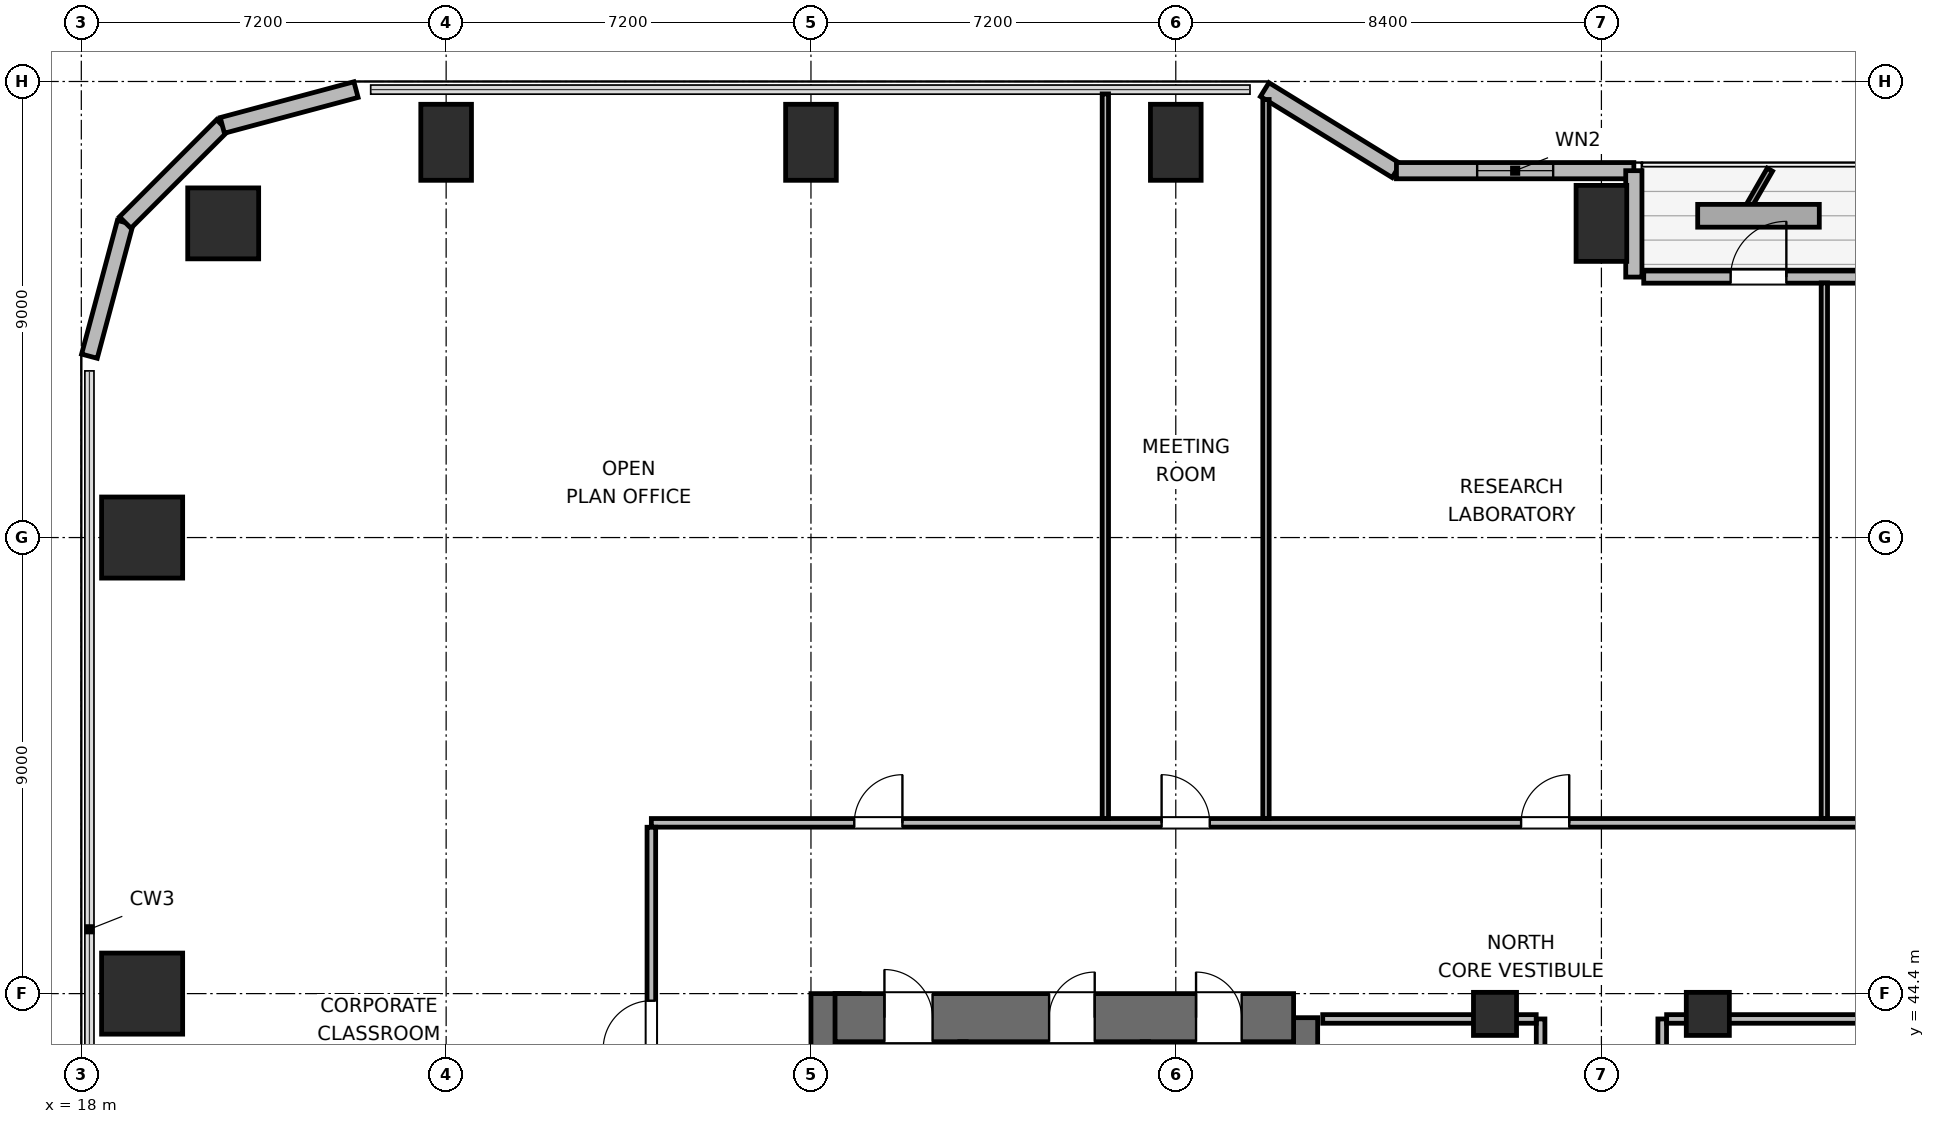
"""IFC4 building model, lengths in metres.
Left out: names, types, materials, properties, quantities, classifications, styles, units other than length and angle.
Written with IfcOpenShell. Run it as: python <this file> out.ifc"""

import sys

from ifc_helpers import new_model, si_unit, direction, frame, frame_2d, origin, origin_2d, place, context, subcontext, project, spatial, rectangle, circle, extrude, element, fill, save


model = new_model("IFC4")
c1 = context("Model", 3, precision=1e-05, world=origin(), true_north=direction((0.0, 1.0)))
c2 = subcontext(c1, "Body", "Model", "MODEL_VIEW")
j1 = project(units=[si_unit("LENGTHUNIT", "METRE"), si_unit("PLANEANGLEUNIT", "RADIAN")], contexts=[c1])
p1 = place(None, origin())
s1 = spatial("IfcSite", under=j1, at=p1, CompositionType="ELEMENT")
p2 = place(p1, origin())
s2 = spatial("IfcBuilding", under=s1, at=p2, CompositionType="ELEMENT")
p3 = place(p2, frame((0.0, 0.0, 89.7)))
s3 = spatial("IfcBuildingStorey", under=s2, at=p3, CompositionType="ELEMENT", Elevation=89.7)
p4 = place(p3, frame((32.875, 27.6, 0.0), z_axis=(0.0, 0.0, 1.0), x_axis=(0.0, 1.0, 0.0)))
e1 = element("IfcWall", 1, at=p4, inside=s3, PredefinedType="SHEAR", context=c2, shape_type="SweptSolid", body=[
    extrude(rectangle(XDim=16.8, YDim=0.95, at=frame_2d((8.4, 0.0))), origin(), (0.0, 0.0, 1.0), 3.9),
])
p5 = place(p3, frame((41.925, 37.8, 0.0), z_axis=(0.0, 0.0, 1.0), x_axis=(0.0, 1.0, 0.0)))
e2 = element("IfcWall", 2, at=p5, inside=s3, PredefinedType="SHEAR", context=c2, shape_type="SweptSolid", body=[
    extrude(rectangle(XDim=6.125, YDim=0.95, at=frame_2d((3.062, 0.0))), origin(), (0.0, 0.0, 1.0), 3.9),
])
p6 = place(p3, frame((32.875, 43.925, 0.0), z_axis=(0.0, 0.0, 1.0), x_axis=(1.0, 0.0, 0.0)))
e3 = element("IfcWall", 3, at=p6, inside=s3, PredefinedType="SHEAR", context=c2, shape_type="SweptSolid", body=[
    extrude(rectangle(XDim=9.05, YDim=0.95, at=frame_2d((4.525, 0.0))), origin(), (0.0, 0.0, 1.0), 3.9),
])
p7 = place(p6, frame((0.975, 0.0, 0.0)))
e4 = element("IfcOpeningElement", 4, at=p7, cuts=e3, PredefinedType="OPENING", context=c2, shape_type="SweptSolid", body=[
    extrude(rectangle(XDim=0.95, YDim=2.04, at=frame_2d((0.475, 1.02))), frame((0.0, 0.485, 0.0), z_axis=(0.0, -1.0, 0.0), x_axis=(1.0, 0.0, 0.0)), (0.0, 0.0, 1.0), 0.97),
])
p8 = place(p6, frame((4.225, 0.0, 0.0)))
e5 = element("IfcOpeningElement", 5, at=p8, cuts=e3, PredefinedType="OPENING", context=c2, shape_type="SweptSolid", body=[
    extrude(rectangle(XDim=0.9, YDim=2.02, at=frame_2d((0.45, 1.01))), frame((0.0, 0.485, 0.0), z_axis=(0.0, -1.0, 0.0), x_axis=(1.0, 0.0, 0.0)), (0.0, 0.0, 1.0), 0.97),
])
p9 = place(p6, frame((7.125, 0.0, 0.0)))
e6 = element("IfcOpeningElement", 6, at=p9, cuts=e3, PredefinedType="OPENING", context=c2, shape_type="SweptSolid", body=[
    extrude(rectangle(XDim=0.9, YDim=2.02, at=frame_2d((0.45, 1.01))), frame((0.0, 0.485, 0.0), z_axis=(0.0, -1.0, 0.0), x_axis=(1.0, 0.0, 0.0)), (0.0, 0.0, 1.0), 0.97),
])
p10 = place(p3, frame((20.8, 59.6, 0.0), z_axis=(0.0, 0.0, 1.0), x_axis=(1.0, 0.0, 0.0)))
e7 = element("IfcColumn", 7, at=p10, inside=s3, PredefinedType="COLUMN", context=c2, shape_type="SweptSolid", body=[
    extrude(circle(Radius=0.7, at=origin_2d()), origin(), (0.0, 0.0, 1.0), 3.9),
])
for number, where, z_axis, x_axis in (
    (8, (25.2, 61.2, 0.0), (0.0, 0.0, 1.0), (1.0, 0.0, 0.0)),
    (9, (32.4, 61.2, 0.0), (0.0, 0.0, 1.0), (1.0, 0.0, 0.0)),
    (10, (39.6, 61.2, 0.0), (0.0, 0.0, 1.0), (1.0, 0.0, 0.0)),
    (11, (48.0, 59.6, 0.0), (0.0, 0.0, 1.0), (1.0, 0.0, 0.0)),
):
    element("IfcColumn", number, at=place(p3, frame(where, z_axis=z_axis, x_axis=x_axis)), inside=s3, PredefinedType="COLUMN", context=c2, shape_type="SweptSolid", body=[
        extrude(rectangle(XDim=1.0, YDim=1.5, at=origin_2d()), origin(), (0.0, 0.0, 1.0), 3.9),
    ])
for number, where, z_axis, x_axis in (
    (12, (19.2, 44.4, 0.0), (0.0, 0.0, 1.0), (1.0, 0.0, 0.0)),
    (13, (19.2, 53.4, 0.0), (0.0, 0.0, 1.0), (1.0, 0.0, 0.0)),
):
    element("IfcColumn", number, at=place(p3, frame(where, z_axis=z_axis, x_axis=x_axis)), inside=s3, PredefinedType="COLUMN", context=c2, shape_type="SweptSolid", body=[
        extrude(rectangle(XDim=1.6, YDim=1.6, at=origin_2d()), origin(), (0.0, 0.0, 1.0), 3.9),
    ])
for number, where, z_axis, x_axis in (
    (14, (45.9, 44.0, 0.0), (0.0, 0.0, 1.0), (1.0, 0.0, 0.0)),
    (15, (50.1, 44.0, 0.0), (0.0, 0.0, 1.0), (1.0, 0.0, 0.0)),
):
    element("IfcColumn", number, at=place(p3, frame(where, z_axis=z_axis, x_axis=x_axis)), inside=s3, PredefinedType="COLUMN", context=c2, shape_type="SweptSolid", body=[
        extrude(rectangle(XDim=0.85, YDim=0.85, at=origin_2d()), origin(), (0.0, 0.0, 1.0), 3.9),
    ])
p11 = place(p3, frame((18.16, 56.979, 0.0), z_axis=(0.0, 0.0, 1.0), x_axis=(0.25869736047, 0.965958423373, 0.0)))
e16 = element("IfcWall", 16, at=p11, inside=s3, PredefinedType="SOLIDWALL", context=c2, shape_type="SweptSolid", body=[
    extrude(rectangle(XDim=2.731, YDim=0.32, at=frame_2d((1.366, 0.0))), origin(), (0.0, 0.0, 1.0), 3.64),
])
p12 = place(p3, frame((18.866, 59.617, 0.0), z_axis=(0.0, 0.0, 1.0), x_axis=(0.707106781187, 0.707106781187, 0.0)))
e17 = element("IfcWall", 17, at=p12, inside=s3, PredefinedType="SOLIDWALL", context=c2, shape_type="SweptSolid", body=[
    extrude(rectangle(XDim=2.71, YDim=0.32, at=frame_2d((1.355, 0.0))), origin(), (0.0, 0.0, 1.0), 3.64),
])
p13 = place(p3, frame((20.783, 61.533, 0.0), z_axis=(0.0, 0.0, 1.0), x_axis=(0.965964405026, 0.25867502435, 0.0)))
e18 = element("IfcWall", 18, at=p13, inside=s3, PredefinedType="SOLIDWALL", context=c2, shape_type="SweptSolid", body=[
    extrude(rectangle(XDim=2.731, YDim=0.32, at=frame_2d((1.366, 0.0))), origin(), (0.0, 0.0, 1.0), 3.64),
])
p14 = place(p3, frame((41.355, 62.24, 0.0), z_axis=(0.0, 0.0, 1.0), x_axis=(0.851630857047, -0.524142044989, 0.0)))
e19 = element("IfcWall", 19, at=p14, inside=s3, PredefinedType="SOLIDWALL", context=c2, shape_type="SweptSolid", body=[
    extrude(rectangle(XDim=3.053, YDim=0.32, at=frame_2d((1.526, 0.0))), origin(), (0.0, 0.0, 1.0), 2.875),
])
p15 = place(p3, frame((43.955, 60.64, 0.0), z_axis=(0.0, 0.0, 1.0), x_axis=(1.0, 0.0, 0.0)))
e20 = element("IfcWall", 20, at=p15, inside=s3, PredefinedType="SOLIDWALL", context=c2, shape_type="SweptSolid", body=[
    extrude(rectangle(XDim=4.685, YDim=0.32, at=frame_2d((2.343, 0.0))), origin(), (0.0, 0.0, 1.0), 2.875),
])
p16 = place(p15, frame((1.593, 0.0, 0.85)))
e21 = element("IfcOpeningElement", 21, at=p16, cuts=e20, PredefinedType="OPENING", context=c2, shape_type="SweptSolid", body=[
    extrude(rectangle(XDim=1.5, YDim=1.1, at=frame_2d((0.75, 0.55))), frame((0.0, 0.17, 0.0), z_axis=(0.0, -1.0, 0.0), x_axis=(1.0, 0.0, 0.0)), (0.0, 0.0, 1.0), 0.34),
])
p17 = place(p3, frame((48.64, 60.64, 0.0), z_axis=(0.0, 0.0, 1.0), x_axis=(0.0, -1.0, 0.0)))
e22 = element("IfcWall", 22, at=p17, inside=s3, PredefinedType="SOLIDWALL", context=c2, shape_type="SweptSolid", body=[
    extrude(rectangle(XDim=2.1, YDim=0.32, at=frame_2d((1.05, 0.0))), origin(), (0.0, 0.0, 1.0), 2.875),
])
p18 = place(p3, frame((48.835, 58.54, 0.0), z_axis=(0.0, 0.0, 1.0), x_axis=(1.0, 0.0, 0.0)))
e23 = element("IfcWall", 23, at=p18, inside=s3, PredefinedType="SOLIDWALL", context=c2, shape_type="SweptSolid", body=[
    extrude(rectangle(XDim=4.53, YDim=0.24, at=frame_2d((2.265, 0.0))), origin(), (0.0, 0.0, 1.0), 3.64),
])
p19 = place(p18, frame((1.715, 0.0, 0.0)))
e24 = element("IfcOpeningElement", 24, at=p19, cuts=e23, PredefinedType="OPENING", context=c2, shape_type="SweptSolid", body=[
    extrude(rectangle(XDim=1.1, YDim=2.04, at=frame_2d((0.55, 1.02))), frame((0.0, 0.13, 0.0), z_axis=(0.0, -1.0, 0.0), x_axis=(1.0, 0.0, 0.0)), (0.0, 0.0, 1.0), 0.26),
])
for number, where, z_axis, x_axis in (
    (25, (35.4, 41.095, 0.0), (0.0, 0.0, 1.0), (0.0, 1.0, 0.0)),
    (26, (39.0, 41.095, 0.0), (0.0, 0.0, 1.0), (0.0, 1.0, 0.0)),
):
    element("IfcWall", number, at=place(p3, frame(where, z_axis=z_axis, x_axis=x_axis)), inside=s3, PredefinedType="PARTITIONING", context=c2, shape_type="SweptSolid", body=[
        extrude(rectangle(XDim=2.355, YDim=0.125, at=frame_2d((1.177, 0.0))), origin(), (0.0, 0.0, 1.0), 3.64),
    ])
p20 = place(p3, frame((46.8, 37.9, 0.0), z_axis=(0.0, 0.0, 1.0), x_axis=(0.0, 1.0, 0.0)))
e27 = element("IfcWall", 27, at=p20, inside=s3, PredefinedType="PARTITIONING", context=c2, shape_type="SweptSolid", body=[
    extrude(rectangle(XDim=6.0, YDim=0.17, at=frame_2d((3.0, 0.0))), origin(), (0.0, 0.0, 1.0), 3.64),
])
p21 = place(p20, frame((1.47, 0.0, 0.0)))
e28 = element("IfcOpeningElement", 28, at=p21, cuts=e27, PredefinedType="OPENING", context=c2, shape_type="SweptSolid", body=[
    extrude(rectangle(XDim=0.9, YDim=2.02, at=frame_2d((0.45, 1.01))), frame((0.0, 0.095, 0.0), z_axis=(0.0, -1.0, 0.0), x_axis=(1.0, 0.0, 0.0)), (0.0, 0.0, 1.0), 0.19),
])
p22 = place(p20, frame((4.47, 0.0, 0.0)))
e29 = element("IfcOpeningElement", 29, at=p22, cuts=e27, PredefinedType="OPENING", context=c2, shape_type="SweptSolid", body=[
    extrude(rectangle(XDim=0.9, YDim=2.02, at=frame_2d((0.45, 1.01))), frame((0.0, 0.095, 0.0), z_axis=(0.0, -1.0, 0.0), x_axis=(1.0, 0.0, 0.0)), (0.0, 0.0, 1.0), 0.19),
])
p23 = place(p3, frame((42.5, 43.9, 0.0), z_axis=(0.0, 0.0, 1.0), x_axis=(1.0, 0.0, 0.0)))
e30 = element("IfcWall", 30, at=p23, inside=s3, PredefinedType="PARTITIONING", context=c2, shape_type="SweptSolid", body=[
    extrude(rectangle(XDim=4.213, YDim=0.17, at=frame_2d((2.106, 0.0))), origin(), (0.0, 0.0, 1.0), 2.525),
])
p24 = place(p3, frame((49.2, 37.9, 0.0), z_axis=(0.0, 0.0, 1.0), x_axis=(0.0, 1.0, 0.0)))
e31 = element("IfcWall", 31, at=p24, inside=s3, PredefinedType="PARTITIONING", context=c2, shape_type="SweptSolid", body=[
    extrude(rectangle(XDim=6.0, YDim=0.17, at=frame_2d((3.0, 0.0))), origin(), (0.0, 0.0, 1.0), 3.64),
])
p25 = place(p24, frame((2.55, 0.0, 0.0)))
e32 = element("IfcOpeningElement", 32, at=p25, cuts=e31, PredefinedType="OPENING", context=c2, shape_type="SweptSolid", body=[
    extrude(rectangle(XDim=0.9, YDim=2.02, at=frame_2d((0.45, 1.01))), frame((0.0, 0.095, 0.0), z_axis=(0.0, -1.0, 0.0), x_axis=(1.0, 0.0, 0.0)), (0.0, 0.0, 1.0), 0.19),
])
p26 = place(p3, frame((49.287, 43.9, 0.0), z_axis=(0.0, 0.0, 1.0), x_axis=(1.0, 0.0, 0.0)))
e33 = element("IfcWall", 33, at=p26, inside=s3, PredefinedType="PARTITIONING", context=c2, shape_type="SweptSolid", body=[
    extrude(rectangle(XDim=4.113, YDim=0.17, at=frame_2d((2.056, 0.0))), origin(), (0.0, 0.0, 1.0), 2.525),
])
p27 = place(p3, frame((29.25, 47.77, 0.0), z_axis=(0.0, 0.0, 1.0), x_axis=(1.0, 0.0, 0.0)))
e34 = element("IfcWall", 34, at=p27, inside=s3, PredefinedType="PARTITIONING", context=c2, shape_type="SweptSolid", body=[
    extrude(rectangle(XDim=37.5, YDim=0.17, at=frame_2d((18.75, 0.0))), origin(), (0.0, 0.0, 1.0), 3.64),
])
p28 = place(p27, frame((4.005, 0.0, 0.0)))
e35 = element("IfcOpeningElement", 35, at=p28, cuts=e34, PredefinedType="OPENING", context=c2, shape_type="SweptSolid", body=[
    extrude(rectangle(XDim=0.95, YDim=2.04, at=frame_2d((0.475, 1.02))), frame((0.0, 0.095, 0.0), z_axis=(0.0, -1.0, 0.0), x_axis=(1.0, 0.0, 0.0)), (0.0, 0.0, 1.0), 0.19),
])
p29 = place(p27, frame((10.07, 0.0, 0.0)))
e36 = element("IfcOpeningElement", 36, at=p29, cuts=e34, PredefinedType="OPENING", context=c2, shape_type="SweptSolid", body=[
    extrude(rectangle(XDim=0.95, YDim=2.04, at=frame_2d((0.475, 1.02))), frame((0.0, 0.095, 0.0), z_axis=(0.0, -1.0, 0.0), x_axis=(1.0, 0.0, 0.0)), (0.0, 0.0, 1.0), 0.19),
])
p30 = place(p27, frame((17.165, 0.0, 0.0)))
e37 = element("IfcOpeningElement", 37, at=p30, cuts=e34, PredefinedType="OPENING", context=c2, shape_type="SweptSolid", body=[
    extrude(rectangle(XDim=0.95, YDim=2.04, at=frame_2d((0.475, 1.02))), frame((0.0, 0.095, 0.0), z_axis=(0.0, -1.0, 0.0), x_axis=(1.0, 0.0, 0.0)), (0.0, 0.0, 1.0), 0.19),
])
p31 = place(p27, frame((25.37, 0.0, 0.0)))
e38 = element("IfcOpeningElement", 38, at=p31, cuts=e34, PredefinedType="OPENING", context=c2, shape_type="SweptSolid", body=[
    extrude(rectangle(XDim=0.95, YDim=2.04, at=frame_2d((0.475, 1.02))), frame((0.0, 0.095, 0.0), z_axis=(0.0, -1.0, 0.0), x_axis=(1.0, 0.0, 0.0)), (0.0, 0.0, 1.0), 0.19),
])
p32 = place(p27, frame((32.545, 0.0, 0.0)))
e39 = element("IfcOpeningElement", 39, at=p32, cuts=e34, PredefinedType="OPENING", context=c2, shape_type="SweptSolid", body=[
    extrude(rectangle(XDim=0.95, YDim=2.04, at=frame_2d((0.475, 1.02))), frame((0.0, 0.095, 0.0), z_axis=(0.0, -1.0, 0.0), x_axis=(1.0, 0.0, 0.0)), (0.0, 0.0, 1.0), 0.19),
])
p33 = place(p3, frame((29.25, 24.317, 0.0), z_axis=(0.0, 0.0, 1.0), x_axis=(0.0, 1.0, 0.0)))
e40 = element("IfcWall", 40, at=p33, inside=s3, PredefinedType="PARTITIONING", context=c2, shape_type="SweptSolid", body=[
    extrude(rectangle(XDim=23.366, YDim=0.17, at=frame_2d((11.683, 0.0))), origin(), (0.0, 0.0, 1.0), 3.64),
])
p34 = place(p33, frame((4.023, 0.0, 0.0)))
e41 = element("IfcOpeningElement", 41, at=p34, cuts=e40, PredefinedType="OPENING", context=c2, shape_type="SweptSolid", body=[
    extrude(rectangle(XDim=0.95, YDim=2.04, at=frame_2d((0.475, 1.02))), frame((0.0, 0.095, 0.0), z_axis=(0.0, -1.0, 0.0), x_axis=(1.0, 0.0, 0.0)), (0.0, 0.0, 1.0), 0.19),
])
p35 = place(p33, frame((11.808, 0.0, 0.0)))
e42 = element("IfcOpeningElement", 42, at=p35, cuts=e40, PredefinedType="OPENING", context=c2, shape_type="SweptSolid", body=[
    extrude(rectangle(XDim=0.95, YDim=2.04, at=frame_2d((0.475, 1.02))), frame((0.0, 0.095, 0.0), z_axis=(0.0, -1.0, 0.0), x_axis=(1.0, 0.0, 0.0)), (0.0, 0.0, 1.0), 0.19),
])
p36 = place(p33, frame((18.993, 0.0, 0.0)))
e43 = element("IfcOpeningElement", 43, at=p36, cuts=e40, PredefinedType="OPENING", context=c2, shape_type="SweptSolid", body=[
    extrude(rectangle(XDim=0.95, YDim=2.04, at=frame_2d((0.475, 1.02))), frame((0.0, 0.095, 0.0), z_axis=(0.0, -1.0, 0.0), x_axis=(1.0, 0.0, 0.0)), (0.0, 0.0, 1.0), 0.19),
])
p37 = place(p3, frame((38.21, 47.857, 0.0), z_axis=(0.0, 0.0, 1.0), x_axis=(0.0, 1.0, 0.0)))
e44 = element("IfcWall", 44, at=p37, inside=s3, PredefinedType="PARTITIONING", context=c2, shape_type="SweptSolid", body=[
    extrude(rectangle(XDim=14.298, YDim=0.125, at=frame_2d((7.149, 0.0))), origin(), (0.0, 0.0, 1.0), 3.64),
])
p38 = place(p3, frame((41.38, 47.857, 0.0), z_axis=(0.0, 0.0, 1.0), x_axis=(0.0, 1.0, 0.0)))
e45 = element("IfcWall", 45, at=p38, inside=s3, PredefinedType="PARTITIONING", context=c2, shape_type="SweptSolid", body=[
    extrude(rectangle(XDim=14.188, YDim=0.125, at=frame_2d((7.094, 0.0))), origin(), (0.0, 0.0, 1.0), 3.003),
])
p39 = place(p3, frame((52.4, 47.857, 0.0), z_axis=(0.0, 0.0, 1.0), x_axis=(0.0, 1.0, 0.0)))
e46 = element("IfcWall", 46, at=p39, inside=s3, PredefinedType="PARTITIONING", context=c2, shape_type="SweptSolid", body=[
    extrude(rectangle(XDim=10.568, YDim=0.125, at=frame_2d((5.284, 0.0))), origin(), (0.0, 0.0, 1.0), 3.003),
])
p40 = place(p16, origin())
e47 = element("IfcWindow", 47, at=p40, inside=s3, PartitioningType="SINGLE_PANEL", PredefinedType="WINDOW", context=c2, shape_type="SweptSolid", body=[
    extrude(rectangle(XDim=1.5, YDim=1.1, at=frame_2d((0.75, 0.55))), frame((0.0, 0.03, 0.0), z_axis=(0.0, -1.0, 0.0), x_axis=(1.0, 0.0, 0.0)), (0.0, 0.0, 1.0), 0.06),
])
fill(e21, e47)
p41 = place(p19, origin())
e48 = element("IfcDoor", 48, at=p41, inside=s3, OperationType="SINGLE_SWING_RIGHT", PredefinedType="DOOR", context=c2, shape_type="SweptSolid", body=[
    extrude(rectangle(XDim=1.1, YDim=2.04, at=frame_2d((0.55, 1.02))), frame((0.0, 0.025, 0.0), z_axis=(0.0, -1.0, 0.0), x_axis=(1.0, 0.0, 0.0)), (0.0, 0.0, 1.0), 0.05),
])
fill(e24, e48)
p42 = place(p7, origin())
e49 = element("IfcDoor", 49, at=p42, inside=s3, OperationType="SINGLE_SWING_LEFT", PredefinedType="DOOR", context=c2, shape_type="SweptSolid", body=[
    extrude(rectangle(XDim=0.95, YDim=2.04, at=frame_2d((0.475, 1.02))), frame((0.0, 0.025, 0.0), z_axis=(0.0, -1.0, 0.0), x_axis=(1.0, 0.0, 0.0)), (0.0, 0.0, 1.0), 0.05),
])
fill(e4, e49)
p43 = place(p8, origin())
e50 = element("IfcDoor", 50, at=p43, inside=s3, OperationType="SINGLE_SWING_RIGHT", PredefinedType="DOOR", context=c2, shape_type="SweptSolid", body=[
    extrude(rectangle(XDim=0.9, YDim=2.02, at=frame_2d((0.45, 1.01))), frame((0.0, 0.025, 0.0), z_axis=(0.0, -1.0, 0.0), x_axis=(1.0, 0.0, 0.0)), (0.0, 0.0, 1.0), 0.05),
])
fill(e5, e50)
p44 = place(p9, origin())
e51 = element("IfcDoor", 51, at=p44, inside=s3, OperationType="SINGLE_SWING_LEFT", PredefinedType="DOOR", context=c2, shape_type="SweptSolid", body=[
    extrude(rectangle(XDim=0.9, YDim=2.02, at=frame_2d((0.45, 1.01))), frame((0.0, 0.025, 0.0), z_axis=(0.0, -1.0, 0.0), x_axis=(1.0, 0.0, 0.0)), (0.0, 0.0, 1.0), 0.05),
])
fill(e6, e51)
p45 = place(p28, origin())
e52 = element("IfcDoor", 52, at=p45, inside=s3, OperationType="SINGLE_SWING_RIGHT", PredefinedType="DOOR", context=c2, shape_type="SweptSolid", body=[
    extrude(rectangle(XDim=0.95, YDim=2.04, at=frame_2d((0.475, 1.02))), frame((0.0, 0.025, 0.0), z_axis=(0.0, -1.0, 0.0), x_axis=(1.0, 0.0, 0.0)), (0.0, 0.0, 1.0), 0.05),
])
fill(e35, e52)
p46 = place(p29, origin())
e53 = element("IfcDoor", 53, at=p46, inside=s3, OperationType="SINGLE_SWING_LEFT", PredefinedType="DOOR", context=c2, shape_type="SweptSolid", body=[
    extrude(rectangle(XDim=0.95, YDim=2.04, at=frame_2d((0.475, 1.02))), frame((0.0, 0.025, 0.0), z_axis=(0.0, -1.0, 0.0), x_axis=(1.0, 0.0, 0.0)), (0.0, 0.0, 1.0), 0.05),
])
fill(e36, e53)
p47 = place(p30, origin())
e54 = element("IfcDoor", 54, at=p47, inside=s3, OperationType="SINGLE_SWING_RIGHT", PredefinedType="DOOR", context=c2, shape_type="SweptSolid", body=[
    extrude(rectangle(XDim=0.95, YDim=2.04, at=frame_2d((0.475, 1.02))), frame((0.0, 0.025, 0.0), z_axis=(0.0, -1.0, 0.0), x_axis=(1.0, 0.0, 0.0)), (0.0, 0.0, 1.0), 0.05),
])
fill(e37, e54)
p48 = place(p36, origin())
e55 = element("IfcDoor", 55, at=p48, inside=s3, OperationType="SINGLE_SWING_LEFT", PredefinedType="DOOR", context=c2, shape_type="SweptSolid", body=[
    extrude(rectangle(XDim=0.95, YDim=2.04, at=frame_2d((0.475, 1.02))), frame((0.0, 0.025, 0.0), z_axis=(0.0, -1.0, 0.0), x_axis=(1.0, 0.0, 0.0)), (0.0, 0.0, 1.0), 0.05),
])
fill(e43, e55)
save(model, sys.argv[1])
